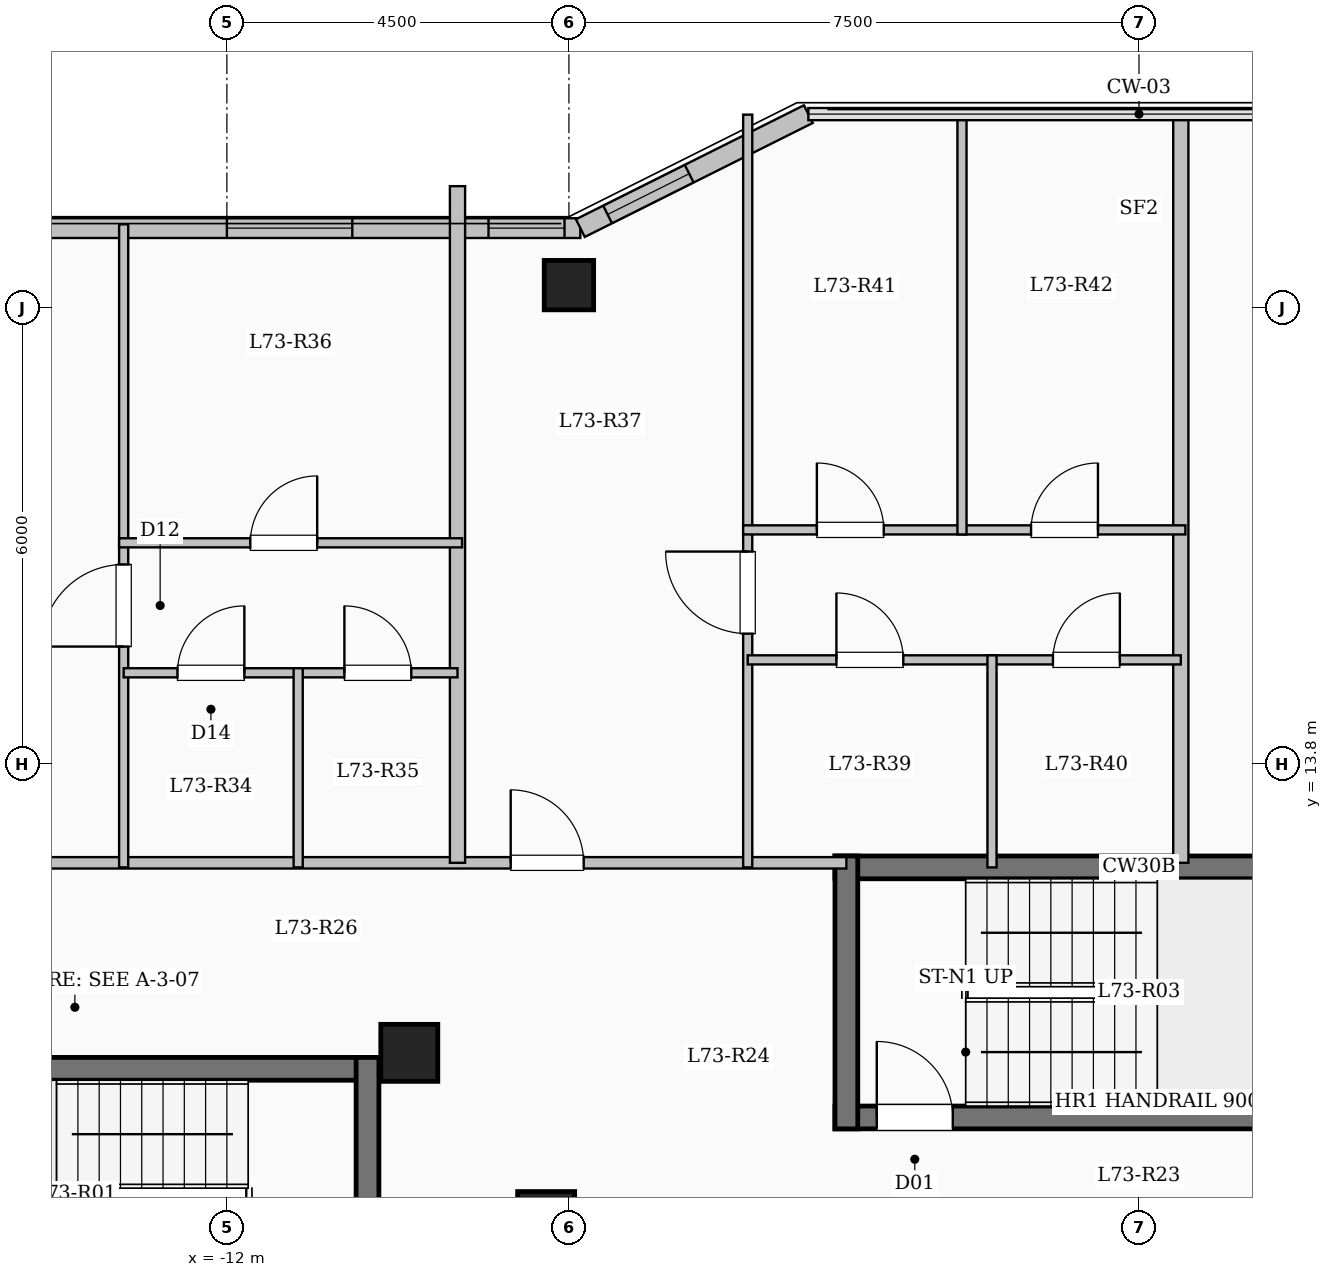
"""IFC4 building model, lengths in metres.
Left out: names, types, materials, properties, quantities, classifications, styles, units other than length and angle.
Written with IfcOpenShell. Run it as: python <this file> out.ifc"""

import sys

from ifc_helpers import new_model, si_unit, direction, frame, frame_2d, origin, origin_2d, place, context, subcontext, project, spatial, rectangle, extrude, element, fill, save


model = new_model("IFC4")
c1 = context("Model", 3, precision=1e-05, world=origin(), true_north=direction((0.0, 1.0)))
c2 = subcontext(c1, "Body", "Model", "MODEL_VIEW")
j1 = project(units=[si_unit("LENGTHUNIT", "METRE"), si_unit("PLANEANGLEUNIT", "RADIAN")], contexts=[c1])
p1 = place(None, origin())
s1 = spatial("IfcSite", under=j1, at=p1, CompositionType="ELEMENT")
p2 = place(p1, origin())
s2 = spatial("IfcBuilding", under=s1, at=p2, CompositionType="ELEMENT")
p3 = place(p2, frame((0.0, 0.0, 268.3)))
s3 = spatial("IfcBuildingStorey", under=s2, at=p3, CompositionType="ELEMENT", Elevation=268.3)
for number, where, z_axis, x_axis in (
    (1, (-7.8, 7.8, 0.0), (0.0, 0.0, 1.0), (1.0, 0.0, 0.0)),
    (2, (-9.6, 10.0, 0.0), (0.0, 0.0, 1.0), (1.0, 0.0, 0.0)),
):
    element("IfcColumn", number, at=place(p3, frame(where, z_axis=z_axis, x_axis=x_axis)), inside=s3, PredefinedType="COLUMN", context=c2, shape_type="SweptSolid", body=[
        extrude(rectangle(XDim=0.75, YDim=0.75, at=origin_2d()), origin(), (0.0, 0.0, 1.0), 3.35),
    ])
p4 = place(p3, frame((-7.5, 20.1, 0.0), z_axis=(0.0, 0.0, 1.0), x_axis=(1.0, 0.0, 0.0)))
e3 = element("IfcColumn", 3, at=p4, inside=s3, PredefinedType="COLUMN", context=c2, shape_type="SweptSolid", body=[
    extrude(rectangle(XDim=0.65, YDim=0.65, at=origin_2d()), origin(), (0.0, 0.0, 1.0), 3.35),
])
p5 = place(p3, frame((-17.85, 20.85, 0.0), z_axis=(0.0, 0.0, 1.0), x_axis=(1.0, 0.0, 0.0)))
e4 = element("IfcWall", 4, at=p5, inside=s3, PredefinedType="SOLIDWALL", context=c2, shape_type="SweptSolid", body=[
    extrude(rectangle(XDim=10.5, YDim=0.26, at=frame_2d((5.25, 0.0))), origin(), (0.0, 0.0, 1.0), 3.05),
])
p6 = place(p5, frame((1.175, 0.0, 0.9)))
e5 = element("IfcOpeningElement", 5, at=p6, cuts=e4, PredefinedType="OPENING", context=c2, shape_type="SweptSolid", body=[
    extrude(rectangle(XDim=2.2, YDim=1.75, at=frame_2d((1.1, 0.875))), frame((0.0, 0.14, 0.0), z_axis=(0.0, -1.0, 0.0), x_axis=(1.0, 0.0, 0.0)), (0.0, 0.0, 1.0), 0.28),
])
p7 = place(p5, frame((5.85, 0.0, 0.9)))
e6 = element("IfcOpeningElement", 6, at=p7, cuts=e4, PredefinedType="OPENING", context=c2, shape_type="SweptSolid", body=[
    extrude(rectangle(XDim=1.65, YDim=1.6, at=frame_2d((0.825, 0.8))), frame((0.0, 0.14, 0.0), z_axis=(0.0, -1.0, 0.0), x_axis=(1.0, 0.0, 0.0)), (0.0, 0.0, 1.0), 0.28),
])
p8 = place(p5, frame((9.292, 0.0, 0.95)))
e7 = element("IfcOpeningElement", 7, at=p8, cuts=e4, PredefinedType="OPENING", context=c2, shape_type="SweptSolid", body=[
    extrude(rectangle(XDim=1.0, YDim=1.5, at=frame_2d((0.5, 0.75))), frame((0.0, 0.14, 0.0), z_axis=(0.0, -1.0, 0.0), x_axis=(1.0, 0.0, 0.0)), (0.0, 0.0, 1.0), 0.28),
])
p9 = place(p3, frame((-7.35, 20.85, 0.0), z_axis=(0.0, 0.0, 1.0), x_axis=(0.894427191, 0.4472135955, 0.0)))
e8 = element("IfcWall", 8, at=p9, inside=s3, PredefinedType="SOLIDWALL", context=c2, shape_type="SweptSolid", body=[
    extrude(rectangle(XDim=3.354, YDim=0.26, at=frame_2d((1.677, 0.0))), origin(), (0.0, 0.0, 1.0), 3.05),
])
p10 = place(p9, frame((0.401, 0.0, 0.95)))
e9 = element("IfcOpeningElement", 9, at=p10, cuts=e8, PredefinedType="OPENING", context=c2, shape_type="SweptSolid", body=[
    extrude(rectangle(XDim=1.2, YDim=1.5, at=frame_2d((0.6, 0.75))), frame((0.0, 0.14, 0.0), z_axis=(0.0, -1.0, 0.0), x_axis=(1.0, 0.0, 0.0)), (0.0, 0.0, 1.0), 0.28),
])
p11 = place(p3, frame((-18.0, 9.79, 0.0), z_axis=(0.0, 0.0, 1.0), x_axis=(1.0, 0.0, 0.0)))
e10 = element("IfcWall", 10, at=p11, inside=s3, PredefinedType="SHEAR", context=c2, shape_type="SweptSolid", body=[
    extrude(rectangle(XDim=8.0, YDim=0.3, at=frame_2d((4.0, 0.0))), origin(), (0.0, 0.0, 1.0), 3.35),
])
p12 = place(p3, frame((-10.15, 6.35, 0.0), z_axis=(0.0, 0.0, 1.0), x_axis=(0.0, 1.0, 0.0)))
e11 = element("IfcWall", 11, at=p12, inside=s3, PredefinedType="SHEAR", context=c2, shape_type="SweptSolid", body=[
    extrude(rectangle(XDim=3.59, YDim=0.3, at=frame_2d((1.795, 0.0))), origin(), (0.0, 0.0, 1.0), 3.35),
])
p13 = place(p3, frame((-4.0, 12.44, 0.0), z_axis=(0.0, 0.0, 1.0), x_axis=(1.0, 0.0, 0.0)))
e12 = element("IfcWall", 12, at=p13, inside=s3, PredefinedType="SHEAR", context=c2, shape_type="SweptSolid", body=[
    extrude(rectangle(XDim=8.0, YDim=0.3, at=frame_2d((4.0, 0.0))), origin(), (0.0, 0.0, 1.0), 3.35),
])
p14 = place(p3, frame((-4.0, 9.15, 0.0), z_axis=(0.0, 0.0, 1.0), x_axis=(1.0, 0.0, 0.0)))
e13 = element("IfcWall", 13, at=p14, inside=s3, PredefinedType="SHEAR", context=c2, shape_type="SweptSolid", body=[
    extrude(rectangle(XDim=8.0, YDim=0.3, at=frame_2d((4.0, 0.0))), origin(), (0.0, 0.0, 1.0), 3.35),
])
p15 = place(p14, frame((0.55, 0.0, 0.0)))
e14 = element("IfcOpeningElement", 14, at=p15, cuts=e13, PredefinedType="OPENING", context=c2, shape_type="SweptSolid", body=[
    extrude(rectangle(XDim=1.0, YDim=2.15, at=frame_2d((0.5, 1.075))), frame((0.0, 0.16, 0.0), z_axis=(0.0, -1.0, 0.0), x_axis=(1.0, 0.0, 0.0)), (0.0, 0.0, 1.0), 0.32),
])
p16 = place(p3, frame((-3.85, 9.0, 0.0), z_axis=(0.0, 0.0, 1.0), x_axis=(0.0, 1.0, 0.0)))
e15 = element("IfcWall", 15, at=p16, inside=s3, PredefinedType="SHEAR", context=c2, shape_type="SweptSolid", body=[
    extrude(rectangle(XDim=3.59, YDim=0.3, at=frame_2d((1.795, 0.0))), origin(), (0.0, 0.0, 1.0), 3.35),
])
p17 = place(p3, frame((-17.75, 12.5, 0.0), z_axis=(0.0, 0.0, 1.0), x_axis=(1.0, 0.0, 0.0)))
e16 = element("IfcWall", 16, at=p17, inside=s3, PredefinedType="PARTITIONING", context=c2, shape_type="SweptSolid", body=[
    extrude(rectangle(XDim=13.9, YDim=0.15, at=frame_2d((6.95, 0.0))), origin(), (0.0, 0.0, 1.0), 3.05),
])
p18 = place(p17, frame((0.7, 0.0, 0.0)))
e17 = element("IfcOpeningElement", 17, at=p18, cuts=e16, PredefinedType="OPENING", context=c2, shape_type="SweptSolid", body=[
    extrude(rectangle(XDim=0.96, YDim=2.15, at=frame_2d((0.48, 1.075))), frame((0.0, 0.085, 0.0), z_axis=(0.0, -1.0, 0.0), x_axis=(1.0, 0.0, 0.0)), (0.0, 0.0, 1.0), 0.17),
])
p19 = place(p17, frame((9.484, 0.0, 0.0)))
e18 = element("IfcOpeningElement", 18, at=p19, cuts=e16, PredefinedType="OPENING", context=c2, shape_type="SweptSolid", body=[
    extrude(rectangle(XDim=0.96, YDim=2.15, at=frame_2d((0.48, 1.075))), frame((0.0, 0.085, 0.0), z_axis=(0.0, -1.0, 0.0), x_axis=(1.0, 0.0, 0.0)), (0.0, 0.0, 1.0), 0.17),
])
p20 = place(p3, frame((0.55, 12.5, 0.0), z_axis=(0.0, 0.0, 1.0), x_axis=(0.0, 1.0, 0.0)))
e19 = element("IfcWall", 19, at=p20, inside=s3, PredefinedType="SOLIDWALL", context=c2, shape_type="SweptSolid", body=[
    extrude(rectangle(XDim=9.88, YDim=0.2, at=frame_2d((4.94, 0.0))), origin(), (0.0, 0.0, 1.0), 3.05),
])
p21 = place(p3, frame((-8.966, 12.5, 0.0), z_axis=(0.0, 0.0, 1.0), x_axis=(0.0, 1.0, 0.0)))
e20 = element("IfcWall", 20, at=p21, inside=s3, PredefinedType="SOLIDWALL", context=c2, shape_type="SweptSolid", body=[
    extrude(rectangle(XDim=8.902, YDim=0.2, at=frame_2d((4.451, 0.0))), origin(), (0.0, 0.0, 1.0), 3.05),
])
p22 = place(p3, frame((-13.358, 12.44, 0.0), z_axis=(0.0, 0.0, 1.0), x_axis=(0.0, 1.0, 0.0)))
e21 = element("IfcWall", 21, at=p22, inside=s3, PredefinedType="PARTITIONING", context=c2, shape_type="SweptSolid", body=[
    extrude(rectangle(XDim=8.46, YDim=0.12, at=frame_2d((4.23, 0.0))), origin(), (0.0, 0.0, 1.0), 3.05),
])
p23 = place(p22, frame((2.905, 0.0, 0.0)))
e22 = element("IfcOpeningElement", 22, at=p23, cuts=e21, PredefinedType="OPENING", context=c2, shape_type="SweptSolid", body=[
    extrude(rectangle(XDim=1.08, YDim=2.15, at=frame_2d((0.54, 1.075))), frame((0.0, 0.07, 0.0), z_axis=(0.0, -1.0, 0.0), x_axis=(1.0, 0.0, 0.0)), (0.0, 0.0, 1.0), 0.14),
])
p24 = place(p3, frame((-13.358, 15.0, 0.0), z_axis=(0.0, 0.0, 1.0), x_axis=(1.0, 0.0, 0.0)))
e23 = element("IfcWall", 23, at=p24, inside=s3, PredefinedType="PARTITIONING", context=c2, shape_type="SweptSolid", body=[
    extrude(rectangle(XDim=2.296, YDim=0.12, at=frame_2d((1.148, 0.0))), origin(), (0.0, 0.0, 1.0), 3.05),
])
p25 = place(p24, frame((0.708, 0.0, 0.0)))
e24 = element("IfcOpeningElement", 24, at=p25, cuts=e23, PredefinedType="OPENING", context=c2, shape_type="SweptSolid", body=[
    extrude(rectangle(XDim=0.88, YDim=2.1, at=frame_2d((0.44, 1.05))), frame((0.0, 0.07, 0.0), z_axis=(0.0, -1.0, 0.0), x_axis=(1.0, 0.0, 0.0)), (0.0, 0.0, 1.0), 0.14),
])
p26 = place(p3, frame((-11.062, 15.0, 0.0), z_axis=(0.0, 0.0, 1.0), x_axis=(1.0, 0.0, 0.0)))
e25 = element("IfcWall", 25, at=p26, inside=s3, PredefinedType="PARTITIONING", context=c2, shape_type="SweptSolid", body=[
    extrude(rectangle(XDim=2.096, YDim=0.12, at=frame_2d((1.048, 0.0))), origin(), (0.0, 0.0, 1.0), 3.05),
])
p27 = place(p26, frame((0.608, 0.0, 0.0)))
e26 = element("IfcOpeningElement", 26, at=p27, cuts=e25, PredefinedType="OPENING", context=c2, shape_type="SweptSolid", body=[
    extrude(rectangle(XDim=0.88, YDim=2.1, at=frame_2d((0.44, 1.05))), frame((0.0, 0.07, 0.0), z_axis=(0.0, -1.0, 0.0), x_axis=(1.0, 0.0, 0.0)), (0.0, 0.0, 1.0), 0.14),
])
p28 = place(p3, frame((-13.418, 16.71, 0.0), z_axis=(0.0, 0.0, 1.0), x_axis=(1.0, 0.0, 0.0)))
e27 = element("IfcWall", 27, at=p28, inside=s3, PredefinedType="PARTITIONING", context=c2, shape_type="SweptSolid", body=[
    extrude(rectangle(XDim=4.512, YDim=0.12, at=frame_2d((2.256, 0.0))), origin(), (0.0, 0.0, 1.0), 2.735),
])
p29 = place(p28, frame((1.726, 0.0, 0.0)))
e28 = element("IfcOpeningElement", 28, at=p29, cuts=e27, PredefinedType="OPENING", context=c2, shape_type="SweptSolid", body=[
    extrude(rectangle(XDim=0.88, YDim=2.1, at=frame_2d((0.44, 1.05))), frame((0.0, 0.07, 0.0), z_axis=(0.0, -1.0, 0.0), x_axis=(1.0, 0.0, 0.0)), (0.0, 0.0, 1.0), 0.14),
])
p30 = place(p3, frame((-11.062, 12.44, 0.0), z_axis=(0.0, 0.0, 1.0), x_axis=(0.0, 1.0, 0.0)))
e29 = element("IfcWall", 29, at=p30, inside=s3, PredefinedType="PARTITIONING", context=c2, shape_type="SweptSolid", body=[
    extrude(rectangle(XDim=2.62, YDim=0.12, at=frame_2d((1.31, 0.0))), origin(), (0.0, 0.0, 1.0), 3.05),
])
p31 = place(p3, frame((-5.148, 12.44, 0.0), z_axis=(0.0, 0.0, 1.0), x_axis=(0.0, 1.0, 0.0)))
e30 = element("IfcWall", 30, at=p31, inside=s3, PredefinedType="PARTITIONING", context=c2, shape_type="SweptSolid", body=[
    extrude(rectangle(XDim=9.903, YDim=0.12, at=frame_2d((4.952, 0.0))), origin(), (0.0, 0.0, 1.0), 3.05),
])
p32 = place(p31, frame((3.075, 0.0, 0.0)))
e31 = element("IfcOpeningElement", 31, at=p32, cuts=e30, PredefinedType="OPENING", context=c2, shape_type="SweptSolid", body=[
    extrude(rectangle(XDim=1.08, YDim=2.15, at=frame_2d((0.54, 1.075))), frame((0.0, 0.07, 0.0), z_axis=(0.0, -1.0, 0.0), x_axis=(1.0, 0.0, 0.0)), (0.0, 0.0, 1.0), 0.14),
])
p33 = place(p3, frame((-5.148, 15.17, 0.0), z_axis=(0.0, 0.0, 1.0), x_axis=(1.0, 0.0, 0.0)))
e32 = element("IfcWall", 32, at=p33, inside=s3, PredefinedType="PARTITIONING", context=c2, shape_type="SweptSolid", body=[
    extrude(rectangle(XDim=3.214, YDim=0.12, at=frame_2d((1.607, 0.0))), origin(), (0.0, 0.0, 1.0), 3.05),
])
p34 = place(p33, frame((1.167, 0.0, 0.0)))
e33 = element("IfcOpeningElement", 33, at=p34, cuts=e32, PredefinedType="OPENING", context=c2, shape_type="SweptSolid", body=[
    extrude(rectangle(XDim=0.88, YDim=2.1, at=frame_2d((0.44, 1.05))), frame((0.0, 0.07, 0.0), z_axis=(0.0, -1.0, 0.0), x_axis=(1.0, 0.0, 0.0)), (0.0, 0.0, 1.0), 0.14),
])
p35 = place(p3, frame((-1.934, 15.17, 0.0), z_axis=(0.0, 0.0, 1.0), x_axis=(1.0, 0.0, 0.0)))
e34 = element("IfcWall", 34, at=p35, inside=s3, PredefinedType="PARTITIONING", context=c2, shape_type="SweptSolid", body=[
    extrude(rectangle(XDim=2.484, YDim=0.12, at=frame_2d((1.242, 0.0))), origin(), (0.0, 0.0, 1.0), 3.05),
])
p36 = place(p35, frame((0.802, 0.0, 0.0)))
e35 = element("IfcOpeningElement", 35, at=p36, cuts=e34, PredefinedType="OPENING", context=c2, shape_type="SweptSolid", body=[
    extrude(rectangle(XDim=0.88, YDim=2.1, at=frame_2d((0.44, 1.05))), frame((0.0, 0.07, 0.0), z_axis=(0.0, -1.0, 0.0), x_axis=(1.0, 0.0, 0.0)), (0.0, 0.0, 1.0), 0.14),
])
p37 = place(p3, frame((-5.208, 16.88, 0.0), z_axis=(0.0, 0.0, 1.0), x_axis=(1.0, 0.0, 0.0)))
e36 = element("IfcWall", 36, at=p37, inside=s3, PredefinedType="PARTITIONING", context=c2, shape_type="SweptSolid", body=[
    extrude(rectangle(XDim=5.818, YDim=0.12, at=frame_2d((2.909, 0.0))), origin(), (0.0, 0.0, 1.0), 2.735),
])
p38 = place(p37, frame((0.97, 0.0, 0.0)))
e37 = element("IfcOpeningElement", 37, at=p38, cuts=e36, PredefinedType="OPENING", context=c2, shape_type="SweptSolid", body=[
    extrude(rectangle(XDim=0.88, YDim=2.1, at=frame_2d((0.44, 1.05))), frame((0.0, 0.07, 0.0), z_axis=(0.0, -1.0, 0.0), x_axis=(1.0, 0.0, 0.0)), (0.0, 0.0, 1.0), 0.14),
])
p39 = place(p37, frame((3.788, 0.0, 0.0)))
e38 = element("IfcOpeningElement", 38, at=p39, cuts=e36, PredefinedType="OPENING", context=c2, shape_type="SweptSolid", body=[
    extrude(rectangle(XDim=0.88, YDim=2.1, at=frame_2d((0.44, 1.05))), frame((0.0, 0.07, 0.0), z_axis=(0.0, -1.0, 0.0), x_axis=(1.0, 0.0, 0.0)), (0.0, 0.0, 1.0), 0.14),
])
p40 = place(p3, frame((-1.934, 12.44, 0.0), z_axis=(0.0, 0.0, 1.0), x_axis=(0.0, 1.0, 0.0)))
e39 = element("IfcWall", 39, at=p40, inside=s3, PredefinedType="PARTITIONING", context=c2, shape_type="SweptSolid", body=[
    extrude(rectangle(XDim=2.79, YDim=0.12, at=frame_2d((1.395, 0.0))), origin(), (0.0, 0.0, 1.0), 3.05),
])
p41 = place(p3, frame((-2.329, 16.82, 0.0), z_axis=(0.0, 0.0, 1.0), x_axis=(0.0, 1.0, 0.0)))
e40 = element("IfcWall", 40, at=p41, inside=s3, PredefinedType="PARTITIONING", context=c2, shape_type="SweptSolid", body=[
    extrude(rectangle(XDim=5.56, YDim=0.12, at=frame_2d((2.78, 0.0))), origin(), (0.0, 0.0, 1.0), 3.05),
])
p42 = place(p7, origin())
e41 = element("IfcWindow", 41, at=p42, inside=s3, PartitioningType="SINGLE_PANEL", PredefinedType="WINDOW", context=c2, shape_type="SweptSolid", body=[
    extrude(rectangle(XDim=1.65, YDim=1.6, at=frame_2d((0.825, 0.8))), frame((0.0, 0.03, 0.0), z_axis=(0.0, -1.0, 0.0), x_axis=(1.0, 0.0, 0.0)), (0.0, 0.0, 1.0), 0.06),
])
fill(e6, e41)
p43 = place(p8, origin())
e42 = element("IfcWindow", 42, at=p43, inside=s3, PartitioningType="SINGLE_PANEL", PredefinedType="WINDOW", context=c2, shape_type="SweptSolid", body=[
    extrude(rectangle(XDim=1.0, YDim=1.5, at=frame_2d((0.5, 0.75))), frame((0.0, 0.03, 0.0), z_axis=(0.0, -1.0, 0.0), x_axis=(1.0, 0.0, 0.0)), (0.0, 0.0, 1.0), 0.06),
])
fill(e7, e42)
p44 = place(p10, origin())
e43 = element("IfcWindow", 43, at=p44, inside=s3, PartitioningType="SINGLE_PANEL", PredefinedType="WINDOW", context=c2, shape_type="SweptSolid", body=[
    extrude(rectangle(XDim=1.2, YDim=1.5, at=frame_2d((0.6, 0.75))), frame((0.0, 0.03, 0.0), z_axis=(0.0, -1.0, 0.0), x_axis=(1.0, 0.0, 0.0)), (0.0, 0.0, 1.0), 0.06),
])
fill(e9, e43)
p45 = place(p15, origin())
e44 = element("IfcDoor", 44, at=p45, inside=s3, OperationType="SINGLE_SWING_LEFT", PredefinedType="DOOR", context=c2, shape_type="SweptSolid", body=[
    extrude(rectangle(XDim=1.0, YDim=2.15, at=frame_2d((0.5, 1.075))), frame((0.0, 0.025, 0.0), z_axis=(0.0, -1.0, 0.0), x_axis=(1.0, 0.0, 0.0)), (0.0, 0.0, 1.0), 0.05),
])
fill(e14, e44)
p46 = place(p23, origin())
e45 = element("IfcDoor", 45, at=p46, inside=s3, OperationType="SINGLE_SWING_LEFT", PredefinedType="DOOR", context=c2, shape_type="SweptSolid", body=[
    extrude(rectangle(XDim=1.08, YDim=2.15, at=frame_2d((0.54, 1.075))), frame((0.0, 0.025, 0.0), z_axis=(0.0, -1.0, 0.0), x_axis=(1.0, 0.0, 0.0)), (0.0, 0.0, 1.0), 0.05),
])
fill(e22, e45)
p47 = place(p25, origin())
e46 = element("IfcDoor", 46, at=p47, inside=s3, OperationType="SINGLE_SWING_RIGHT", PredefinedType="DOOR", context=c2, shape_type="SweptSolid", body=[
    extrude(rectangle(XDim=0.88, YDim=2.1, at=frame_2d((0.44, 1.05))), frame((0.0, 0.025, 0.0), z_axis=(0.0, -1.0, 0.0), x_axis=(1.0, 0.0, 0.0)), (0.0, 0.0, 1.0), 0.05),
])
fill(e24, e46)
p48 = place(p27, origin())
e47 = element("IfcDoor", 47, at=p48, inside=s3, OperationType="SINGLE_SWING_LEFT", PredefinedType="DOOR", context=c2, shape_type="SweptSolid", body=[
    extrude(rectangle(XDim=0.88, YDim=2.1, at=frame_2d((0.44, 1.05))), frame((0.0, 0.025, 0.0), z_axis=(0.0, -1.0, 0.0), x_axis=(1.0, 0.0, 0.0)), (0.0, 0.0, 1.0), 0.05),
])
fill(e26, e47)
p49 = place(p29, origin())
e48 = element("IfcDoor", 48, at=p49, inside=s3, OperationType="SINGLE_SWING_RIGHT", PredefinedType="DOOR", context=c2, shape_type="SweptSolid", body=[
    extrude(rectangle(XDim=0.88, YDim=2.1, at=frame_2d((0.44, 1.05))), frame((0.0, 0.025, 0.0), z_axis=(0.0, -1.0, 0.0), x_axis=(1.0, 0.0, 0.0)), (0.0, 0.0, 1.0), 0.05),
])
fill(e28, e48)
p50 = place(p19, origin())
e49 = element("IfcDoor", 49, at=p50, inside=s3, OperationType="SINGLE_SWING_LEFT", PredefinedType="DOOR", context=c2, shape_type="SweptSolid", body=[
    extrude(rectangle(XDim=0.96, YDim=2.15, at=frame_2d((0.48, 1.075))), frame((0.0, 0.025, 0.0), z_axis=(0.0, -1.0, 0.0), x_axis=(1.0, 0.0, 0.0)), (0.0, 0.0, 1.0), 0.05),
])
fill(e18, e49)
p51 = place(p32, origin())
e50 = element("IfcDoor", 50, at=p51, inside=s3, OperationType="SINGLE_SWING_RIGHT", PredefinedType="DOOR", context=c2, shape_type="SweptSolid", body=[
    extrude(rectangle(XDim=1.08, YDim=2.15, at=frame_2d((0.54, 1.075))), frame((0.0, 0.025, 0.0), z_axis=(0.0, -1.0, 0.0), x_axis=(1.0, 0.0, 0.0)), (0.0, 0.0, 1.0), 0.05),
])
fill(e31, e50)
p52 = place(p34, origin())
e51 = element("IfcDoor", 51, at=p52, inside=s3, OperationType="SINGLE_SWING_LEFT", PredefinedType="DOOR", context=c2, shape_type="SweptSolid", body=[
    extrude(rectangle(XDim=0.88, YDim=2.1, at=frame_2d((0.44, 1.05))), frame((0.0, 0.025, 0.0), z_axis=(0.0, -1.0, 0.0), x_axis=(1.0, 0.0, 0.0)), (0.0, 0.0, 1.0), 0.05),
])
fill(e33, e51)
p53 = place(p36, origin())
e52 = element("IfcDoor", 52, at=p53, inside=s3, OperationType="SINGLE_SWING_RIGHT", PredefinedType="DOOR", context=c2, shape_type="SweptSolid", body=[
    extrude(rectangle(XDim=0.88, YDim=2.1, at=frame_2d((0.44, 1.05))), frame((0.0, 0.025, 0.0), z_axis=(0.0, -1.0, 0.0), x_axis=(1.0, 0.0, 0.0)), (0.0, 0.0, 1.0), 0.05),
])
fill(e35, e52)
p54 = place(p38, origin())
e53 = element("IfcDoor", 53, at=p54, inside=s3, OperationType="SINGLE_SWING_LEFT", PredefinedType="DOOR", context=c2, shape_type="SweptSolid", body=[
    extrude(rectangle(XDim=0.88, YDim=2.1, at=frame_2d((0.44, 1.05))), frame((0.0, 0.025, 0.0), z_axis=(0.0, -1.0, 0.0), x_axis=(1.0, 0.0, 0.0)), (0.0, 0.0, 1.0), 0.05),
])
fill(e37, e53)
p55 = place(p39, origin())
e54 = element("IfcDoor", 54, at=p55, inside=s3, OperationType="SINGLE_SWING_RIGHT", PredefinedType="DOOR", context=c2, shape_type="SweptSolid", body=[
    extrude(rectangle(XDim=0.88, YDim=2.1, at=frame_2d((0.44, 1.05))), frame((0.0, 0.025, 0.0), z_axis=(0.0, -1.0, 0.0), x_axis=(1.0, 0.0, 0.0)), (0.0, 0.0, 1.0), 0.05),
])
fill(e38, e54)
save(model, sys.argv[1])
